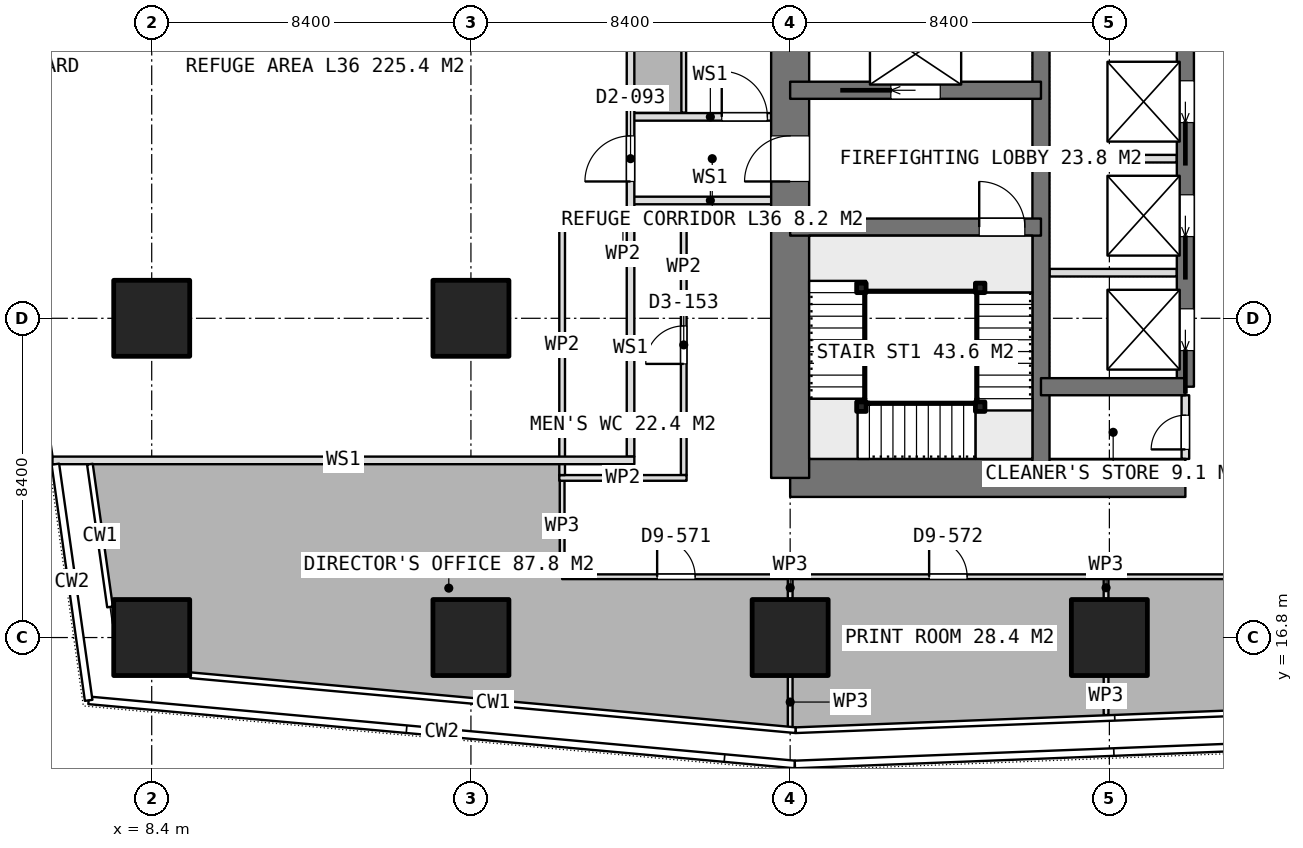
"""IFC4 building model, lengths in metres.
Left out: names, types, materials, properties, quantities, classifications, styles, units other than length and angle.
Written with IfcOpenShell. Run it as: python <this file> out.ifc"""

import sys

from ifc_helpers import new_model, si_unit, direction, frame, frame_2d, origin, origin_2d, place, context, subcontext, project, spatial, rectangle, extrude, element, fill, save


model = new_model("IFC4")
c1 = context("Model", 3, precision=1e-05, world=origin(), true_north=direction((0.0, 1.0)))
c2 = subcontext(c1, "Body", "Model", "MODEL_VIEW")
j1 = project(units=[si_unit("LENGTHUNIT", "METRE"), si_unit("PLANEANGLEUNIT", "RADIAN")], contexts=[c1])
p1 = place(None, origin())
s1 = spatial("IfcSite", under=j1, at=p1, CompositionType="ELEMENT")
p2 = place(p1, origin())
s2 = spatial("IfcBuilding", under=s1, at=p2, CompositionType="ELEMENT")
p3 = place(p2, frame((0.0, 0.0, 144.05)))
s3 = spatial("IfcBuildingStorey", under=s2, at=p3, CompositionType="ELEMENT", Elevation=144.05)
p4 = place(p3, frame((25.2, 21.0, 0.0), z_axis=(0.0, 0.0, 1.0), x_axis=(1.0, 0.0, 0.0)))
e1 = element("IfcWall", 1, at=p4, inside=s3, PredefinedType="SHEAR", context=c2, shape_type="SweptSolid", body=[
    extrude(rectangle(XDim=10.4, YDim=1.0, at=frame_2d((5.2, 0.0))), origin(), (0.0, 0.0, 1.0), 3.75),
])
p5 = place(p3, frame((25.2, 21.0, 0.0), z_axis=(0.0, 0.0, 1.0), x_axis=(0.0, 1.0, 0.0)))
e2 = element("IfcWall", 2, at=p5, inside=s3, PredefinedType="SHEAR", context=c2, shape_type="SweptSolid", body=[
    extrude(rectangle(XDim=25.2, YDim=1.0, at=frame_2d((12.6, 0.0))), origin(), (0.0, 0.0, 1.0), 3.75),
])
p6 = place(p5, frame((7.8, 0.0, 0.0)))
e3 = element("IfcOpeningElement", 3, at=p6, cuts=e2, PredefinedType="OPENING", context=c2, shape_type="SweptSolid", body=[
    extrude(rectangle(XDim=1.2, YDim=2.1, at=frame_2d((0.6, 1.05))), frame((0.0, 0.51, 0.0), z_axis=(0.0, -1.0, 0.0), x_axis=(1.0, 0.0, 0.0)), (0.0, 0.0, 1.0), 1.02),
])
p7 = place(p5, frame((14.25, 0.0, 0.0)))
e4 = element("IfcOpeningElement", 4, at=p7, cuts=e2, PredefinedType="OPENING", context=c2, shape_type="SweptSolid", body=[
    extrude(rectangle(XDim=0.9, YDim=2.1, at=frame_2d((0.45, 1.05))), frame((0.0, 0.51, 0.0), z_axis=(0.0, -1.0, 0.0), x_axis=(1.0, 0.0, 0.0)), (0.0, 0.0, 1.0), 1.02),
])
p8 = place(p5, frame((16.85, 0.0, 0.0)))
e5 = element("IfcOpeningElement", 5, at=p8, cuts=e2, PredefinedType="OPENING", context=c2, shape_type="SweptSolid", body=[
    extrude(rectangle(XDim=0.9, YDim=2.1, at=frame_2d((0.45, 1.05))), frame((0.0, 0.51, 0.0), z_axis=(0.0, -1.0, 0.0), x_axis=(1.0, 0.0, 0.0)), (0.0, 0.0, 1.0), 1.02),
])
p9 = place(p5, frame((19.025, 0.0, 0.0)))
e6 = element("IfcOpeningElement", 6, at=p9, cuts=e2, PredefinedType="OPENING", context=c2, shape_type="SweptSolid", body=[
    extrude(rectangle(XDim=1.2, YDim=2.1, at=frame_2d((0.6, 1.05))), frame((0.0, 0.51, 0.0), z_axis=(0.0, -1.0, 0.0), x_axis=(1.0, 0.0, 0.0)), (0.0, 0.0, 1.0), 1.02),
])
p10 = place(p3, frame((31.8, 21.0, 0.0), z_axis=(0.0, 0.0, 1.0), x_axis=(0.0, 1.0, 0.0)))
e7 = element("IfcWall", 7, at=p10, inside=s3, PredefinedType="SHEAR", context=c2, shape_type="SweptSolid", body=[
    extrude(rectangle(XDim=25.2, YDim=0.45, at=frame_2d((12.6, 0.0))), origin(), (0.0, 0.0, 1.0), 3.75),
])
p11 = place(p3, frame((35.6, 23.4, 0.0), z_axis=(0.0, 0.0, 1.0), x_axis=(0.0, 1.0, 0.0)))
e8 = element("IfcWall", 8, at=p11, inside=s3, PredefinedType="SHEAR", context=c2, shape_type="SweptSolid", body=[
    extrude(rectangle(XDim=18.0, YDim=0.45, at=frame_2d((9.0, 0.0))), origin(), (0.0, 0.0, 1.0), 3.75),
])
p12 = place(p11, frame((0.95, 0.0, 0.0)))
e9 = element("IfcOpeningElement", 9, at=p12, cuts=e8, PredefinedType="OPENING", context=c2, shape_type="SweptSolid", body=[
    extrude(rectangle(XDim=1.1, YDim=2.1, at=frame_2d((0.55, 1.05))), frame((0.0, 0.235, 0.0), z_axis=(0.0, -1.0, 0.0), x_axis=(1.0, 0.0, 0.0)), (0.0, 0.0, 1.0), 0.47),
])
p13 = place(p11, frame((3.95, 0.0, 0.0)))
e10 = element("IfcOpeningElement", 10, at=p13, cuts=e8, PredefinedType="OPENING", context=c2, shape_type="SweptSolid", body=[
    extrude(rectangle(XDim=1.1, YDim=2.1, at=frame_2d((0.55, 1.05))), frame((0.0, 0.235, 0.0), z_axis=(0.0, -1.0, 0.0), x_axis=(1.0, 0.0, 0.0)), (0.0, 0.0, 1.0), 0.47),
])
p14 = place(p11, frame((6.95, 0.0, 0.0)))
e11 = element("IfcOpeningElement", 11, at=p14, cuts=e8, PredefinedType="OPENING", context=c2, shape_type="SweptSolid", body=[
    extrude(rectangle(XDim=1.1, YDim=2.1, at=frame_2d((0.55, 1.05))), frame((0.0, 0.235, 0.0), z_axis=(0.0, -1.0, 0.0), x_axis=(1.0, 0.0, 0.0)), (0.0, 0.0, 1.0), 0.47),
])
p15 = place(p11, frame((9.95, 0.0, 0.0)))
e12 = element("IfcOpeningElement", 12, at=p15, cuts=e8, PredefinedType="OPENING", context=c2, shape_type="SweptSolid", body=[
    extrude(rectangle(XDim=1.1, YDim=2.1, at=frame_2d((0.55, 1.05))), frame((0.0, 0.235, 0.0), z_axis=(0.0, -1.0, 0.0), x_axis=(1.0, 0.0, 0.0)), (0.0, 0.0, 1.0), 0.47),
])
p16 = place(p11, frame((12.95, 0.0, 0.0)))
e13 = element("IfcOpeningElement", 13, at=p16, cuts=e8, PredefinedType="OPENING", context=c2, shape_type="SweptSolid", body=[
    extrude(rectangle(XDim=1.1, YDim=2.1, at=frame_2d((0.55, 1.05))), frame((0.0, 0.235, 0.0), z_axis=(0.0, -1.0, 0.0), x_axis=(1.0, 0.0, 0.0)), (0.0, 0.0, 1.0), 0.47),
])
p17 = place(p11, frame((15.95, 0.0, 0.0)))
e14 = element("IfcOpeningElement", 14, at=p17, cuts=e8, PredefinedType="OPENING", context=c2, shape_type="SweptSolid", body=[
    extrude(rectangle(XDim=1.1, YDim=2.1, at=frame_2d((0.55, 1.05))), frame((0.0, 0.235, 0.0), z_axis=(0.0, -1.0, 0.0), x_axis=(1.0, 0.0, 0.0)), (0.0, 0.0, 1.0), 0.47),
])
p18 = place(p3, frame((31.8, 23.4, 0.0), z_axis=(0.0, 0.0, 1.0), x_axis=(1.0, 0.0, 0.0)))
e15 = element("IfcWall", 15, at=p18, inside=s3, PredefinedType="SHEAR", context=c2, shape_type="SweptSolid", body=[
    extrude(rectangle(XDim=3.8, YDim=0.45, at=frame_2d((1.9, 0.0))), origin(), (0.0, 0.0, 1.0), 3.75),
])
p19 = place(p3, frame((25.2, 27.6, 0.0), z_axis=(0.0, 0.0, 1.0), x_axis=(1.0, 0.0, 0.0)))
e16 = element("IfcWall", 16, at=p19, inside=s3, PredefinedType="SHEAR", context=c2, shape_type="SweptSolid", body=[
    extrude(rectangle(XDim=6.6, YDim=0.45, at=frame_2d((3.3, 0.0))), origin(), (0.0, 0.0, 1.0), 3.75),
])
p20 = place(p19, frame((4.975, 0.0, 0.0)))
e17 = element("IfcOpeningElement", 17, at=p20, cuts=e16, PredefinedType="OPENING", context=c2, shape_type="SweptSolid", body=[
    extrude(rectangle(XDim=1.2, YDim=2.1, at=frame_2d((0.6, 1.05))), frame((0.0, 0.235, 0.0), z_axis=(0.0, -1.0, 0.0), x_axis=(1.0, 0.0, 0.0)), (0.0, 0.0, 1.0), 0.47),
])
p21 = place(p3, frame((25.2, 31.2, 0.0), z_axis=(0.0, 0.0, 1.0), x_axis=(1.0, 0.0, 0.0)))
e18 = element("IfcWall", 18, at=p21, inside=s3, PredefinedType="SHEAR", context=c2, shape_type="SweptSolid", body=[
    extrude(rectangle(XDim=6.6, YDim=0.45, at=frame_2d((3.3, 0.0))), origin(), (0.0, 0.0, 1.0), 3.75),
])
p22 = place(p21, frame((2.65, 0.0, 0.0)))
e19 = element("IfcOpeningElement", 19, at=p22, cuts=e18, PredefinedType="OPENING", context=c2, shape_type="SweptSolid", body=[
    extrude(rectangle(XDim=1.3, YDim=2.1, at=frame_2d((0.65, 1.05))), frame((0.0, 0.235, 0.0), z_axis=(0.0, -1.0, 0.0), x_axis=(1.0, 0.0, 0.0)), (0.0, 0.0, 1.0), 0.47),
])
for number, where, z_axis, x_axis in (
    (20, (8.4, 16.8, 0.0), (0.0, 0.0, 1.0), (1.0, 0.0, 0.0)),
    (21, (8.4, 25.2, 0.0), (0.0, 0.0, 1.0), (1.0, 0.0, 0.0)),
    (22, (16.8, 16.8, 0.0), (0.0, 0.0, 1.0), (1.0, 0.0, 0.0)),
    (23, (16.8, 25.2, 0.0), (0.0, 0.0, 1.0), (1.0, 0.0, 0.0)),
    (24, (25.2, 16.8, 0.0), (0.0, 0.0, 1.0), (1.0, 0.0, 0.0)),
    (25, (33.6, 16.8, 0.0), (0.0, 0.0, 1.0), (1.0, 0.0, 0.0)),
):
    element("IfcColumn", number, at=place(p3, frame(where, z_axis=z_axis, x_axis=x_axis)), inside=s3, PredefinedType="COLUMN", context=c2, shape_type="SweptSolid", body=[
        extrude(rectangle(XDim=2.0, YDim=2.0, at=origin_2d()), origin(), (0.0, 0.0, 1.0), 3.75),
    ])
for number, where, z_axis, x_axis in (
    (26, (32.025, 26.4, 0.0), (0.0, 0.0, 1.0), (1.0, 0.0, 0.0)),
    (27, (32.025, 29.4, 0.0), (0.0, 0.0, 1.0), (1.0, 0.0, 0.0)),
):
    element("IfcWall", number, at=place(p3, frame(where, z_axis=z_axis, x_axis=x_axis)), inside=s3, PredefinedType="PARTITIONING", context=c2, shape_type="SweptSolid", body=[
        extrude(rectangle(XDim=3.35, YDim=0.2, at=frame_2d((1.675, 0.0))), origin(), (0.0, 0.0, 1.0), 3.5),
    ])
p23 = place(p3, frame((35.6, 21.5, 0.0), z_axis=(0.0, 0.0, 1.0), x_axis=(0.0, 1.0, 0.0)))
e28 = element("IfcWall", 28, at=p23, inside=s3, PredefinedType="PARTITIONING", context=c2, shape_type="SweptSolid", body=[
    extrude(rectangle(XDim=1.675, YDim=0.2, at=frame_2d((0.837, 0.0))), origin(), (0.0, 0.0, 1.0), 3.5),
])
p24 = place(p23, frame((0.25, 0.0, 0.0)))
e29 = element("IfcOpeningElement", 29, at=p24, cuts=e28, PredefinedType="OPENING", context=c2, shape_type="SweptSolid", body=[
    extrude(rectangle(XDim=0.9, YDim=2.1, at=frame_2d((0.45, 1.05))), frame((0.0, 0.11, 0.0), z_axis=(0.0, -1.0, 0.0), x_axis=(1.0, 0.0, 0.0)), (0.0, 0.0, 1.0), 0.22),
])
for number, where, z_axis, x_axis in (
    (30, (19.125, 21.0, 0.0), (0.0, 0.0, 1.0), (1.0, 0.0, 0.0)),
    (31, (19.125, 28.0, 0.0), (0.0, 0.0, 1.0), (1.0, 0.0, 0.0)),
):
    element("IfcWall", number, at=place(p3, frame(where, z_axis=z_axis, x_axis=x_axis)), inside=s3, PredefinedType="PARTITIONING", context=c2, shape_type="SweptSolid", body=[
        extrude(rectangle(XDim=3.35, YDim=0.15, at=frame_2d((1.675, 0.0))), origin(), (0.0, 0.0, 1.0), 3.5),
    ])
p25 = place(p3, frame((19.2, 21.075, 0.0), z_axis=(0.0, 0.0, 1.0), x_axis=(0.0, 1.0, 0.0)))
e32 = element("IfcWall", 32, at=p25, inside=s3, PredefinedType="PARTITIONING", context=c2, shape_type="SweptSolid", body=[
    extrude(rectangle(XDim=6.85, YDim=0.15, at=frame_2d((3.425, 0.0))), origin(), (0.0, 0.0, 1.0), 3.5),
])
p26 = place(p3, frame((22.4, 21.075, 0.0), z_axis=(0.0, 0.0, 1.0), x_axis=(0.0, 1.0, 0.0)))
e33 = element("IfcWall", 33, at=p26, inside=s3, PredefinedType="PARTITIONING", context=c2, shape_type="SweptSolid", body=[
    extrude(rectangle(XDim=6.85, YDim=0.15, at=frame_2d((3.425, 0.0))), origin(), (0.0, 0.0, 1.0), 3.5),
])
p27 = place(p26, frame((2.925, 0.0, 0.0)))
e34 = element("IfcOpeningElement", 34, at=p27, cuts=e33, PredefinedType="OPENING", context=c2, shape_type="SweptSolid", body=[
    extrude(rectangle(XDim=1.0, YDim=2.1, at=frame_2d((0.5, 1.05))), frame((0.0, 0.085, 0.0), z_axis=(0.0, -1.0, 0.0), x_axis=(1.0, 0.0, 0.0)), (0.0, 0.0, 1.0), 0.17),
])
p28 = place(p3, frame((19.2, 21.074, 0.0), z_axis=(0.0, 0.0, 1.0), x_axis=(0.0, -1.0, 0.0)))
e35 = element("IfcWall", 35, at=p28, inside=s3, PredefinedType="PARTITIONING", context=c2, shape_type="SweptSolid", body=[
    extrude(rectangle(XDim=2.674, YDim=0.125, at=frame_2d((1.337, 0.0))), origin(), (0.0, 0.0, 1.0), 3.5),
])
p29 = place(p3, frame((19.2, 18.4, 0.0), z_axis=(0.0, 0.0, 1.0), x_axis=(1.0, 0.0, 0.0)))
e36 = element("IfcWall", 36, at=p29, inside=s3, PredefinedType="PARTITIONING", context=c2, shape_type="SweptSolid", body=[
    extrude(rectangle(XDim=6.001, YDim=0.125, at=frame_2d((3.0, 0.0))), origin(), (0.0, 0.0, 1.0), 3.5),
])
p30 = place(p29, frame((2.5, 0.0, 0.0)))
e37 = element("IfcOpeningElement", 37, at=p30, cuts=e36, PredefinedType="OPENING", context=c2, shape_type="SweptSolid", body=[
    extrude(rectangle(XDim=1.0, YDim=2.1, at=frame_2d((0.5, 1.05))), frame((0.0, 0.073, 0.0), z_axis=(0.0, -1.0, 0.0), x_axis=(1.0, 0.0, 0.0)), (0.0, 0.0, 1.0), 0.145),
])
p31 = place(p3, frame((25.201, 18.4, 0.0), z_axis=(0.0, 0.0, 1.0), x_axis=(0.0, -1.0, 0.0)))
e38 = element("IfcWall", 38, at=p31, inside=s3, PredefinedType="PARTITIONING", context=c2, shape_type="SweptSolid", body=[
    extrude(rectangle(XDim=0.58, YDim=0.125, at=frame_2d((0.29, 0.0))), origin(), (0.0, 0.0, 1.0), 3.5),
])
p32 = place(p3, frame((25.201, 15.78, 0.0), z_axis=(0.0, 0.0, 1.0), x_axis=(0.0, -1.0, 0.0)))
e39 = element("IfcWall", 39, at=p32, inside=s3, PredefinedType="PARTITIONING", context=c2, shape_type="SweptSolid", body=[
    extrude(rectangle(XDim=1.355, YDim=0.125, at=frame_2d((0.677, 0.0))), origin(), (0.0, 0.0, 1.0), 3.5),
])
p33 = place(p3, frame((33.513, 18.4, 0.0), z_axis=(0.0, 0.0, 1.0), x_axis=(0.0, -1.0, 0.0)))
e40 = element("IfcWall", 40, at=p33, inside=s3, PredefinedType="PARTITIONING", context=c2, shape_type="SweptSolid", body=[
    extrude(rectangle(XDim=0.58, YDim=0.125, at=frame_2d((0.29, 0.0))), origin(), (0.0, 0.0, 1.0), 3.5),
])
p34 = place(p3, frame((33.513, 15.78, 0.0), z_axis=(0.0, 0.0, 1.0), x_axis=(0.0, -1.0, 0.0)))
e41 = element("IfcWall", 41, at=p34, inside=s3, PredefinedType="PARTITIONING", context=c2, shape_type="SweptSolid", body=[
    extrude(rectangle(XDim=1.02, YDim=0.125, at=frame_2d((0.51, 0.0))), origin(), (0.0, 0.0, 1.0), 3.5),
])
p35 = place(p3, frame((25.202, 18.4, 0.0), z_axis=(0.0, 0.0, 1.0), x_axis=(1.0, 0.0, 0.0)))
e42 = element("IfcWall", 42, at=p35, inside=s3, PredefinedType="PARTITIONING", context=c2, shape_type="SweptSolid", body=[
    extrude(rectangle(XDim=8.311, YDim=0.125, at=frame_2d((4.156, 0.0))), origin(), (0.0, 0.0, 1.0), 3.5),
])
p36 = place(p35, frame((3.655, 0.0, 0.0)))
e43 = element("IfcOpeningElement", 43, at=p36, cuts=e42, PredefinedType="OPENING", context=c2, shape_type="SweptSolid", body=[
    extrude(rectangle(XDim=1.0, YDim=2.1, at=frame_2d((0.5, 1.05))), frame((0.0, 0.073, 0.0), z_axis=(0.0, -1.0, 0.0), x_axis=(1.0, 0.0, 0.0)), (0.0, 0.0, 1.0), 0.145),
])
p37 = place(p3, frame((22.4, 41.744, 0.0), z_axis=(0.0, 0.0, 1.0), x_axis=(0.0, -1.0, 0.0)))
e44 = element("IfcWall", 44, at=p37, inside=s3, PredefinedType="PARTITIONING", context=c2, shape_type="SweptSolid", body=[
    extrude(rectangle(XDim=11.133, YDim=0.125, at=frame_2d((5.566, 0.0))), origin(), (0.0, 0.0, 1.0), 3.5),
])
p38 = place(p3, frame((33.513, 18.4, 0.0), z_axis=(0.0, 0.0, 1.0), x_axis=(1.0, 0.0, 0.0)))
e45 = element("IfcWall", 45, at=p38, inside=s3, PredefinedType="PARTITIONING", context=c2, shape_type="SweptSolid", body=[
    extrude(rectangle(XDim=16.485, YDim=0.125, at=frame_2d((8.243, 0.0))), origin(), (0.0, 0.0, 1.0), 3.5),
])
p39 = place(p38, frame((5.543, 0.0, 0.0)))
e46 = element("IfcOpeningElement", 46, at=p39, cuts=e45, PredefinedType="OPENING", context=c2, shape_type="SweptSolid", body=[
    extrude(rectangle(XDim=1.8, YDim=2.1, at=frame_2d((0.9, 1.05))), frame((0.0, 0.073, 0.0), z_axis=(0.0, -1.0, 0.0), x_axis=(1.0, 0.0, 0.0)), (0.0, 0.0, 1.0), 0.145),
])
for number, where, z_axis, x_axis in (
    (47, (30.2, 26.0, 0.0), (0.0, 0.0, 1.0), (1.0, 0.0, 0.0)),
    (48, (30.2, 22.875, 0.0), (0.0, 0.0, 1.0), (1.0, 0.0, 0.0)),
    (49, (27.075, 22.875, 0.0), (0.0, 0.0, 1.0), (1.0, 0.0, 0.0)),
    (50, (27.075, 26.0, 0.0), (0.0, 0.0, 1.0), (1.0, 0.0, 0.0)),
):
    element("IfcColumn", number, at=place(p3, frame(where, z_axis=z_axis, x_axis=x_axis)), inside=s3, PredefinedType="COLUMN", context=c2, shape_type="SweptSolid", body=[
        extrude(rectangle(XDim=0.25, YDim=0.25, at=origin_2d()), origin(), (0.0, 0.0, 1.0), 3.75),
    ])
p40 = place(p3, frame((21.0, 21.561, 0.0), z_axis=(0.0, 0.0, 1.0), x_axis=(0.0, 1.0, 0.0)))
e51 = element("IfcWall", 51, at=p40, inside=s3, PredefinedType="PARTITIONING", context=c2, shape_type="SweptSolid", body=[
    extrude(rectangle(XDim=14.282, YDim=0.2, at=frame_2d((7.141, 0.0))), origin(), (0.0, 0.0, 1.0), 3.5),
])
p41 = place(p40, frame((7.239, 0.0, 0.0)))
e52 = element("IfcOpeningElement", 52, at=p41, cuts=e51, PredefinedType="OPENING", context=c2, shape_type="SweptSolid", body=[
    extrude(rectangle(XDim=1.2, YDim=2.1, at=frame_2d((0.6, 1.05))), frame((0.0, 0.11, 0.0), z_axis=(0.0, -1.0, 0.0), x_axis=(1.0, 0.0, 0.0)), (0.0, 0.0, 1.0), 0.22),
])
p42 = place(p3, frame((5.789, 21.461, 0.0), z_axis=(0.0, 0.0, 1.0), x_axis=(1.0, 0.0, 0.0)))
e53 = element("IfcWall", 53, at=p42, inside=s3, PredefinedType="PARTITIONING", context=c2, shape_type="SweptSolid", body=[
    extrude(rectangle(XDim=15.311, YDim=0.2, at=frame_2d((7.656, 0.0))), origin(), (0.0, 0.0, 1.0), 3.5),
])
p43 = place(p3, frame((21.0, 30.5, 0.0), z_axis=(0.0, 0.0, 1.0), x_axis=(1.0, 0.0, 0.0)))
e54 = element("IfcWall", 54, at=p43, inside=s3, PredefinedType="PARTITIONING", context=c2, shape_type="SweptSolid", body=[
    extrude(rectangle(XDim=4.2, YDim=0.2, at=frame_2d((2.1, 0.0))), origin(), (0.0, 0.0, 1.0), 3.5),
])
p44 = place(p43, frame((2.4, 0.0, 0.0)))
e55 = element("IfcOpeningElement", 55, at=p44, cuts=e54, PredefinedType="OPENING", context=c2, shape_type="SweptSolid", body=[
    extrude(rectangle(XDim=1.2, YDim=2.1, at=frame_2d((0.6, 1.05))), frame((0.0, 0.11, 0.0), z_axis=(0.0, -1.0, 0.0), x_axis=(1.0, 0.0, 0.0)), (0.0, 0.0, 1.0), 0.22),
])
p45 = place(p3, frame((21.0, 28.3, 0.0), z_axis=(0.0, 0.0, 1.0), x_axis=(1.0, 0.0, 0.0)))
e56 = element("IfcWall", 56, at=p45, inside=s3, PredefinedType="PARTITIONING", context=c2, shape_type="SweptSolid", body=[
    extrude(rectangle(XDim=4.2, YDim=0.2, at=frame_2d((2.1, 0.0))), origin(), (0.0, 0.0, 1.0), 3.5),
])
p46 = place(p6, origin())
e57 = element("IfcDoor", 57, at=p46, inside=s3, OperationType="SINGLE_SWING_LEFT", PredefinedType="DOOR", context=c2, shape_type="SweptSolid", body=[
    extrude(rectangle(XDim=1.2, YDim=2.1, at=frame_2d((0.6, 1.05))), frame((0.0, 0.025, 0.0), z_axis=(0.0, -1.0, 0.0), x_axis=(1.0, 0.0, 0.0)), (0.0, 0.0, 1.0), 0.05),
])
fill(e3, e57)
p47 = place(p24, origin())
e58 = element("IfcDoor", 58, at=p47, inside=s3, OperationType="SINGLE_SWING_LEFT", PredefinedType="DOOR", context=c2, shape_type="SweptSolid", body=[
    extrude(rectangle(XDim=0.9, YDim=2.1, at=frame_2d((0.45, 1.05))), frame((0.0, 0.025, 0.0), z_axis=(0.0, -1.0, 0.0), x_axis=(1.0, 0.0, 0.0)), (0.0, 0.0, 1.0), 0.05),
])
fill(e29, e58)
p48 = place(p12, origin())
e59 = element("IfcDoor", 59, at=p48, inside=s3, OperationType="SLIDING_TO_LEFT", PredefinedType="USERDEFINED", context=c2, shape_type="SweptSolid", body=[
    extrude(rectangle(XDim=1.1, YDim=2.1, at=frame_2d((0.55, 1.05))), frame((0.0, 0.025, 0.0), z_axis=(0.0, -1.0, 0.0), x_axis=(1.0, 0.0, 0.0)), (0.0, 0.0, 1.0), 0.05),
])
fill(e9, e59)
p49 = place(p13, origin())
e60 = element("IfcDoor", 60, at=p49, inside=s3, OperationType="SLIDING_TO_LEFT", PredefinedType="USERDEFINED", context=c2, shape_type="SweptSolid", body=[
    extrude(rectangle(XDim=1.1, YDim=2.1, at=frame_2d((0.55, 1.05))), frame((0.0, 0.025, 0.0), z_axis=(0.0, -1.0, 0.0), x_axis=(1.0, 0.0, 0.0)), (0.0, 0.0, 1.0), 0.05),
])
fill(e10, e60)
p50 = place(p14, origin())
e61 = element("IfcDoor", 61, at=p50, inside=s3, OperationType="SLIDING_TO_LEFT", PredefinedType="USERDEFINED", context=c2, shape_type="SweptSolid", body=[
    extrude(rectangle(XDim=1.1, YDim=2.1, at=frame_2d((0.55, 1.05))), frame((0.0, 0.025, 0.0), z_axis=(0.0, -1.0, 0.0), x_axis=(1.0, 0.0, 0.0)), (0.0, 0.0, 1.0), 0.05),
])
fill(e11, e61)
p51 = place(p22, origin())
e62 = element("IfcDoor", 62, at=p51, inside=s3, OperationType="SLIDING_TO_LEFT", PredefinedType="USERDEFINED", context=c2, shape_type="SweptSolid", body=[
    extrude(rectangle(XDim=1.3, YDim=2.1, at=frame_2d((0.65, 1.05))), frame((0.0, 0.025, 0.0), z_axis=(0.0, -1.0, 0.0), x_axis=(1.0, 0.0, 0.0)), (0.0, 0.0, 1.0), 0.05),
])
fill(e19, e62)
p52 = place(p27, origin())
e63 = element("IfcDoor", 63, at=p52, inside=s3, OperationType="SINGLE_SWING_LEFT", PredefinedType="DOOR", context=c2, shape_type="SweptSolid", body=[
    extrude(rectangle(XDim=1.0, YDim=2.1, at=frame_2d((0.5, 1.05))), frame((0.0, 0.025, 0.0), z_axis=(0.0, -1.0, 0.0), x_axis=(1.0, 0.0, 0.0)), (0.0, 0.0, 1.0), 0.05),
])
fill(e34, e63)
p53 = place(p30, origin())
e64 = element("IfcDoor", 64, at=p53, inside=s3, OperationType="SINGLE_SWING_LEFT", PredefinedType="DOOR", context=c2, shape_type="SweptSolid", body=[
    extrude(rectangle(XDim=1.0, YDim=2.1, at=frame_2d((0.5, 1.05))), frame((0.0, 0.025, 0.0), z_axis=(0.0, -1.0, 0.0), x_axis=(1.0, 0.0, 0.0)), (0.0, 0.0, 1.0), 0.05),
])
fill(e37, e64)
p54 = place(p36, origin())
e65 = element("IfcDoor", 65, at=p54, inside=s3, OperationType="SINGLE_SWING_LEFT", PredefinedType="DOOR", context=c2, shape_type="SweptSolid", body=[
    extrude(rectangle(XDim=1.0, YDim=2.1, at=frame_2d((0.5, 1.05))), frame((0.0, 0.025, 0.0), z_axis=(0.0, -1.0, 0.0), x_axis=(1.0, 0.0, 0.0)), (0.0, 0.0, 1.0), 0.05),
])
fill(e43, e65)
p55 = place(p20, origin())
e66 = element("IfcDoor", 66, at=p55, inside=s3, OperationType="SINGLE_SWING_RIGHT", PredefinedType="DOOR", context=c2, shape_type="SweptSolid", body=[
    extrude(rectangle(XDim=1.2, YDim=2.1, at=frame_2d((0.6, 1.05))), frame((0.0, 0.025, 0.0), z_axis=(0.0, -1.0, 0.0), x_axis=(1.0, 0.0, 0.0)), (0.0, 0.0, 1.0), 0.05),
])
fill(e17, e66)
p56 = place(p41, origin())
e67 = element("IfcDoor", 67, at=p56, inside=s3, OperationType="SINGLE_SWING_LEFT", PredefinedType="DOOR", context=c2, shape_type="SweptSolid", body=[
    extrude(rectangle(XDim=1.2, YDim=2.1, at=frame_2d((0.6, 1.05))), frame((0.0, 0.025, 0.0), z_axis=(0.0, -1.0, 0.0), x_axis=(1.0, 0.0, 0.0)), (0.0, 0.0, 1.0), 0.05),
])
fill(e52, e67)
p57 = place(p44, origin())
e68 = element("IfcDoor", 68, at=p57, inside=s3, OperationType="SINGLE_SWING_LEFT", PredefinedType="DOOR", context=c2, shape_type="SweptSolid", body=[
    extrude(rectangle(XDim=1.2, YDim=2.1, at=frame_2d((0.6, 1.05))), frame((0.0, 0.025, 0.0), z_axis=(0.0, -1.0, 0.0), x_axis=(1.0, 0.0, 0.0)), (0.0, 0.0, 1.0), 0.05),
])
fill(e55, e68)
save(model, sys.argv[1])
